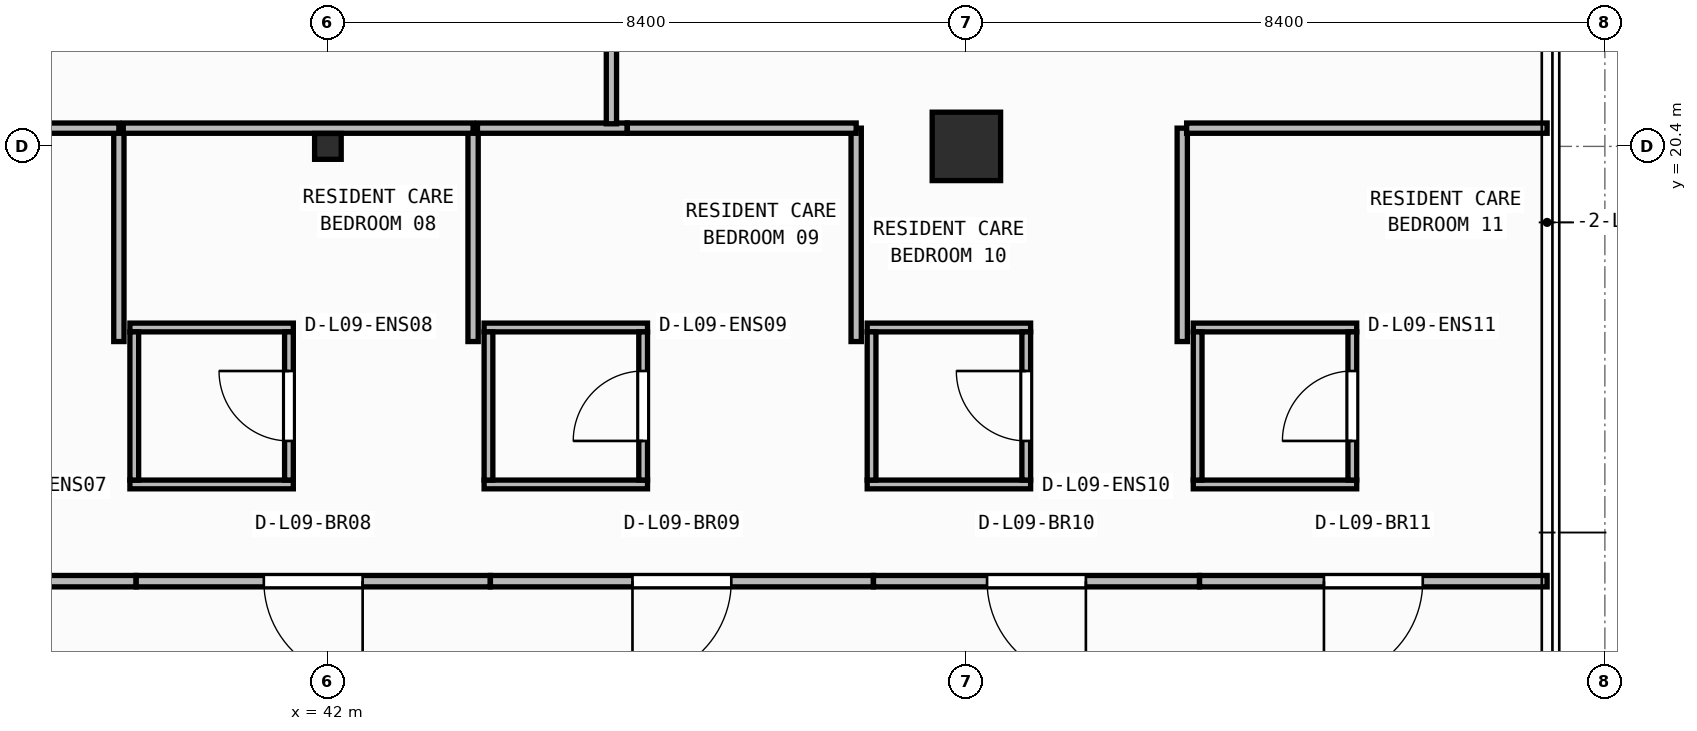
"""IFC4 building model, lengths in metres.
Left out: names, types, materials, properties, quantities, classifications, styles, units other than length and angle.
Written with IfcOpenShell. Run it as: python <this file> out.ifc"""

import sys

from ifc_helpers import new_model, si_unit, direction, frame, frame_2d, origin, origin_2d, place, context, subcontext, project, spatial, rectangle, i_section, extrude, element, fill, save


model = new_model("IFC4")
c1 = context("Model", 3, precision=1e-05, world=origin(), true_north=direction((0.0, 1.0)))
c2 = subcontext(c1, "Body", "Model", "MODEL_VIEW")
j1 = project(units=[si_unit("LENGTHUNIT", "METRE"), si_unit("PLANEANGLEUNIT", "RADIAN")], contexts=[c1])
p1 = place(None, origin())
s1 = spatial("IfcSite", under=j1, at=p1, CompositionType="ELEMENT")
p2 = place(p1, origin())
s2 = spatial("IfcBuilding", under=s1, at=p2, CompositionType="ELEMENT")
p3 = place(p2, frame((0.0, 0.0, 38.3)))
s3 = spatial("IfcBuildingStorey", under=s2, at=p3, CompositionType="ELEMENT", Elevation=38.3)
p4 = place(p3, frame((42.0, 20.4, 0.0), z_axis=(0.0, 0.0, 1.0), x_axis=(1.0, 0.0, 0.0)))
e1 = element("IfcColumn", 1, at=p4, inside=s3, PredefinedType="COLUMN", context=c2, shape_type="SweptSolid", body=[
    extrude(i_section(OverallWidth=0.35, OverallDepth=0.34, WebThickness=0.016, FlangeThickness=0.028, at=origin_2d()), origin(), (0.0, 0.0, 1.0), 3.95),
])
p5 = place(p3, frame((50.4, 20.4, 0.0), z_axis=(0.0, 0.0, 1.0), x_axis=(1.0, 0.0, 0.0)))
e2 = element("IfcColumn", 2, at=p5, inside=s3, PredefinedType="COLUMN", context=c2, shape_type="SweptSolid", body=[
    extrude(rectangle(XDim=0.9, YDim=0.9, at=origin_2d()), origin(), (0.0, 0.0, 1.0), 3.95),
])
p6 = place(p3, frame((39.395, 15.952, 0.0), z_axis=(0.0, 0.0, 1.0), x_axis=(1.0, 0.0, 0.0)))
e3 = element("IfcWall", 3, at=p6, inside=s3, PredefinedType="PARTITIONING", context=c2, shape_type="SweptSolid", body=[
    extrude(rectangle(XDim=2.15, YDim=0.115, at=frame_2d((1.075, 0.0))), origin(), (0.0, 0.0, 1.0), 3.429),
])
p7 = place(p3, frame((39.395, 18.018, 0.0), z_axis=(0.0, 0.0, 1.0), x_axis=(1.0, 0.0, 0.0)))
e4 = element("IfcWall", 4, at=p7, inside=s3, PredefinedType="PARTITIONING", context=c2, shape_type="SweptSolid", body=[
    extrude(rectangle(XDim=2.15, YDim=0.115, at=frame_2d((1.075, 0.0))), origin(), (0.0, 0.0, 1.0), 3.71),
])
p8 = place(p3, frame((39.452, 16.01, 0.0), z_axis=(0.0, 0.0, 1.0), x_axis=(0.0, 1.0, 0.0)))
e5 = element("IfcWall", 5, at=p8, inside=s3, PredefinedType="PARTITIONING", context=c2, shape_type="SweptSolid", body=[
    extrude(rectangle(XDim=1.95, YDim=0.115, at=frame_2d((0.975, 0.0))), origin(), (0.0, 0.0, 1.0), 3.71),
])
p9 = place(p3, frame((41.488, 16.01, 0.0), z_axis=(0.0, 0.0, 1.0), x_axis=(0.0, 1.0, 0.0)))
e6 = element("IfcWall", 6, at=p9, inside=s3, PredefinedType="PARTITIONING", context=c2, shape_type="SweptSolid", body=[
    extrude(rectangle(XDim=1.95, YDim=0.115, at=frame_2d((0.975, 0.0))), origin(), (0.0, 0.0, 1.0), 3.71),
])
p10 = place(p9, frame((0.515, 0.0, 0.0)))
e7 = element("IfcOpeningElement", 7, at=p10, cuts=e6, PredefinedType="OPENING", context=c2, shape_type="SweptSolid", body=[
    extrude(rectangle(XDim=0.92, YDim=2.1, at=frame_2d((0.46, 1.05))), frame((0.0, 0.067, 0.0), z_axis=(0.0, -1.0, 0.0), x_axis=(1.0, 0.0, 0.0)), (0.0, 0.0, 1.0), 0.135),
])
p11 = place(p3, frame((44.055, 15.952, 0.0), z_axis=(0.0, 0.0, 1.0), x_axis=(1.0, 0.0, 0.0)))
e8 = element("IfcWall", 8, at=p11, inside=s3, PredefinedType="PARTITIONING", context=c2, shape_type="SweptSolid", body=[
    extrude(rectangle(XDim=2.15, YDim=0.115, at=frame_2d((1.075, 0.0))), origin(), (0.0, 0.0, 1.0), 3.429),
])
p12 = place(p3, frame((44.055, 18.018, 0.0), z_axis=(0.0, 0.0, 1.0), x_axis=(1.0, 0.0, 0.0)))
e9 = element("IfcWall", 9, at=p12, inside=s3, PredefinedType="PARTITIONING", context=c2, shape_type="SweptSolid", body=[
    extrude(rectangle(XDim=2.15, YDim=0.115, at=frame_2d((1.075, 0.0))), origin(), (0.0, 0.0, 1.0), 3.71),
])
p13 = place(p3, frame((44.113, 16.01, 0.0), z_axis=(0.0, 0.0, 1.0), x_axis=(0.0, 1.0, 0.0)))
e10 = element("IfcWall", 10, at=p13, inside=s3, PredefinedType="PARTITIONING", context=c2, shape_type="SweptSolid", body=[
    extrude(rectangle(XDim=1.95, YDim=0.115, at=frame_2d((0.975, 0.0))), origin(), (0.0, 0.0, 1.0), 3.71),
])
p14 = place(p3, frame((46.147, 16.01, 0.0), z_axis=(0.0, 0.0, 1.0), x_axis=(0.0, 1.0, 0.0)))
e11 = element("IfcWall", 11, at=p14, inside=s3, PredefinedType="PARTITIONING", context=c2, shape_type="SweptSolid", body=[
    extrude(rectangle(XDim=1.95, YDim=0.115, at=frame_2d((0.975, 0.0))), origin(), (0.0, 0.0, 1.0), 3.71),
])
p15 = place(p14, frame((0.515, 0.0, 0.0)))
e12 = element("IfcOpeningElement", 12, at=p15, cuts=e11, PredefinedType="OPENING", context=c2, shape_type="SweptSolid", body=[
    extrude(rectangle(XDim=0.92, YDim=2.1, at=frame_2d((0.46, 1.05))), frame((0.0, 0.067, 0.0), z_axis=(0.0, -1.0, 0.0), x_axis=(1.0, 0.0, 0.0)), (0.0, 0.0, 1.0), 0.135),
])
p16 = place(p3, frame((49.095, 15.952, 0.0), z_axis=(0.0, 0.0, 1.0), x_axis=(1.0, 0.0, 0.0)))
e13 = element("IfcWall", 13, at=p16, inside=s3, PredefinedType="PARTITIONING", context=c2, shape_type="SweptSolid", body=[
    extrude(rectangle(XDim=2.15, YDim=0.115, at=frame_2d((1.075, 0.0))), origin(), (0.0, 0.0, 1.0), 3.429),
])
p17 = place(p3, frame((49.095, 18.018, 0.0), z_axis=(0.0, 0.0, 1.0), x_axis=(1.0, 0.0, 0.0)))
e14 = element("IfcWall", 14, at=p17, inside=s3, PredefinedType="PARTITIONING", context=c2, shape_type="SweptSolid", body=[
    extrude(rectangle(XDim=2.15, YDim=0.115, at=frame_2d((1.075, 0.0))), origin(), (0.0, 0.0, 1.0), 3.71),
])
p18 = place(p3, frame((49.153, 16.01, 0.0), z_axis=(0.0, 0.0, 1.0), x_axis=(0.0, 1.0, 0.0)))
e15 = element("IfcWall", 15, at=p18, inside=s3, PredefinedType="PARTITIONING", context=c2, shape_type="SweptSolid", body=[
    extrude(rectangle(XDim=1.95, YDim=0.115, at=frame_2d((0.975, 0.0))), origin(), (0.0, 0.0, 1.0), 3.71),
])
p19 = place(p3, frame((51.188, 16.01, 0.0), z_axis=(0.0, 0.0, 1.0), x_axis=(0.0, 1.0, 0.0)))
e16 = element("IfcWall", 16, at=p19, inside=s3, PredefinedType="PARTITIONING", context=c2, shape_type="SweptSolid", body=[
    extrude(rectangle(XDim=1.95, YDim=0.115, at=frame_2d((0.975, 0.0))), origin(), (0.0, 0.0, 1.0), 3.71),
])
p20 = place(p19, frame((0.515, 0.0, 0.0)))
e17 = element("IfcOpeningElement", 17, at=p20, cuts=e16, PredefinedType="OPENING", context=c2, shape_type="SweptSolid", body=[
    extrude(rectangle(XDim=0.92, YDim=2.1, at=frame_2d((0.46, 1.05))), frame((0.0, 0.067, 0.0), z_axis=(0.0, -1.0, 0.0), x_axis=(1.0, 0.0, 0.0)), (0.0, 0.0, 1.0), 0.135),
])
for number, where, z_axis, x_axis in (
    (18, (53.385, 15.952, 0.0), (0.0, 0.0, 1.0), (1.0, 0.0, 0.0)),
    (19, (53.385, 18.018, 0.0), (0.0, 0.0, 1.0), (1.0, 0.0, 0.0)),
):
    element("IfcWall", number, at=place(p3, frame(where, z_axis=z_axis, x_axis=x_axis)), inside=s3, PredefinedType="PARTITIONING", context=c2, shape_type="SweptSolid", body=[
        extrude(rectangle(XDim=2.15, YDim=0.115, at=frame_2d((1.075, 0.0))), origin(), (0.0, 0.0, 1.0), 3.71),
    ])
p21 = place(p3, frame((53.442, 16.01, 0.0), z_axis=(0.0, 0.0, 1.0), x_axis=(0.0, 1.0, 0.0)))
e20 = element("IfcWall", 20, at=p21, inside=s3, PredefinedType="PARTITIONING", context=c2, shape_type="SweptSolid", body=[
    extrude(rectangle(XDim=1.95, YDim=0.115, at=frame_2d((0.975, 0.0))), origin(), (0.0, 0.0, 1.0), 3.71),
])
p22 = place(p3, frame((55.478, 16.01, 0.0), z_axis=(0.0, 0.0, 1.0), x_axis=(0.0, 1.0, 0.0)))
e21 = element("IfcWall", 21, at=p22, inside=s3, PredefinedType="PARTITIONING", context=c2, shape_type="SweptSolid", body=[
    extrude(rectangle(XDim=1.95, YDim=0.115, at=frame_2d((0.975, 0.0))), origin(), (0.0, 0.0, 1.0), 3.71),
])
p23 = place(p22, frame((0.515, 0.0, 0.0)))
e22 = element("IfcOpeningElement", 22, at=p23, cuts=e21, PredefinedType="OPENING", context=c2, shape_type="SweptSolid", body=[
    extrude(rectangle(XDim=0.92, YDim=2.1, at=frame_2d((0.46, 1.05))), frame((0.0, 0.067, 0.0), z_axis=(0.0, -1.0, 0.0), x_axis=(1.0, 0.0, 0.0)), (0.0, 0.0, 1.0), 0.135),
])
p24 = place(p3, frame((39.476, 14.68, 0.0), z_axis=(0.0, 0.0, 1.0), x_axis=(-1.0, 0.0, 0.0)))
e23 = element("IfcWall", 23, at=p24, inside=s3, PredefinedType="PARTITIONING", context=c2, shape_type="SweptSolid", body=[
    extrude(rectangle(XDim=4.288, YDim=0.15, at=frame_2d((2.144, 0.0))), origin(), (0.0, 0.0, 1.0), 3.71),
])
p25 = place(p24, frame((1.494, 0.0, 0.0)))
e24 = element("IfcOpeningElement", 24, at=p25, cuts=e23, PredefinedType="OPENING", context=c2, shape_type="SweptSolid", body=[
    extrude(rectangle(XDim=1.3, YDim=2.15, at=frame_2d((0.65, 1.075))), frame((0.0, 0.085, 0.0), z_axis=(0.0, -1.0, 0.0), x_axis=(1.0, 0.0, 0.0)), (0.0, 0.0, 1.0), 0.17),
])
p26 = place(p3, frame((44.136, 14.68, 0.0), z_axis=(0.0, 0.0, 1.0), x_axis=(-1.0, 0.0, 0.0)))
e25 = element("IfcWall", 25, at=p26, inside=s3, PredefinedType="PARTITIONING", context=c2, shape_type="SweptSolid", body=[
    extrude(rectangle(XDim=4.658, YDim=0.15, at=frame_2d((2.329, 0.0))), origin(), (0.0, 0.0, 1.0), 3.71),
])
p27 = place(p26, frame((1.679, 0.0, 0.0)))
e26 = element("IfcOpeningElement", 26, at=p27, cuts=e25, PredefinedType="OPENING", context=c2, shape_type="SweptSolid", body=[
    extrude(rectangle(XDim=1.3, YDim=2.15, at=frame_2d((0.65, 1.075))), frame((0.0, 0.085, 0.0), z_axis=(0.0, -1.0, 0.0), x_axis=(1.0, 0.0, 0.0)), (0.0, 0.0, 1.0), 0.17),
])
p28 = place(p3, frame((49.176, 14.68, 0.0), z_axis=(0.0, 0.0, 1.0), x_axis=(-1.0, 0.0, 0.0)))
e27 = element("IfcWall", 27, at=p28, inside=s3, PredefinedType="PARTITIONING", context=c2, shape_type="SweptSolid", body=[
    extrude(rectangle(XDim=5.038, YDim=0.15, at=frame_2d((2.519, 0.0))), origin(), (0.0, 0.0, 1.0), 3.71),
])
p29 = place(p28, frame((1.869, 0.0, 0.0)))
e28 = element("IfcOpeningElement", 28, at=p29, cuts=e27, PredefinedType="OPENING", context=c2, shape_type="SweptSolid", body=[
    extrude(rectangle(XDim=1.3, YDim=2.15, at=frame_2d((0.65, 1.075))), frame((0.0, 0.085, 0.0), z_axis=(0.0, -1.0, 0.0), x_axis=(1.0, 0.0, 0.0)), (0.0, 0.0, 1.0), 0.17),
])
p30 = place(p3, frame((53.466, 14.68, 0.0), z_axis=(0.0, 0.0, 1.0), x_axis=(-1.0, 0.0, 0.0)))
e29 = element("IfcWall", 29, at=p30, inside=s3, PredefinedType="PARTITIONING", context=c2, shape_type="SweptSolid", body=[
    extrude(rectangle(XDim=4.288, YDim=0.15, at=frame_2d((2.144, 0.0))), origin(), (0.0, 0.0, 1.0), 3.71),
])
p31 = place(p30, frame((1.494, 0.0, 0.0)))
e30 = element("IfcOpeningElement", 30, at=p31, cuts=e29, PredefinedType="OPENING", context=c2, shape_type="SweptSolid", body=[
    extrude(rectangle(XDim=1.3, YDim=2.15, at=frame_2d((0.65, 1.075))), frame((0.0, 0.085, 0.0), z_axis=(0.0, -1.0, 0.0), x_axis=(1.0, 0.0, 0.0)), (0.0, 0.0, 1.0), 0.17),
])
p32 = place(p3, frame((58.04, 14.68, 0.0), z_axis=(0.0, 0.0, 1.0), x_axis=(-1.0, 0.0, 0.0)))
e31 = element("IfcWall", 31, at=p32, inside=s3, PredefinedType="PARTITIONING", context=c2, shape_type="SweptSolid", body=[
    extrude(rectangle(XDim=4.572, YDim=0.15, at=frame_2d((2.286, 0.0))), origin(), (0.0, 0.0, 1.0), 3.71),
])
p33 = place(p32, frame((1.636, 0.0, 0.0)))
e32 = element("IfcOpeningElement", 32, at=p33, cuts=e31, PredefinedType="OPENING", context=c2, shape_type="SweptSolid", body=[
    extrude(rectangle(XDim=1.3, YDim=2.15, at=frame_2d((0.65, 1.075))), frame((0.0, 0.085, 0.0), z_axis=(0.0, -1.0, 0.0), x_axis=(1.0, 0.0, 0.0)), (0.0, 0.0, 1.0), 0.17),
])
p34 = place(p3, frame((39.25, 17.833, 0.0), z_axis=(0.0, 0.0, 1.0), x_axis=(0.0, 1.0, 0.0)))
e33 = element("IfcWall", 33, at=p34, inside=s3, PredefinedType="PARTITIONING", context=c2, shape_type="SweptSolid", body=[
    extrude(rectangle(XDim=2.807, YDim=0.135, at=frame_2d((1.404, 0.0))), origin(), (0.0, 0.0, 1.0), 3.71),
])
p35 = place(p3, frame((39.25, 20.64, 0.0), z_axis=(0.0, 0.0, 1.0), x_axis=(-1.0, 0.0, 0.0)))
e34 = element("IfcWall", 34, at=p35, inside=s3, PredefinedType="PARTITIONING", context=c2, shape_type="SweptSolid", body=[
    extrude(rectangle(XDim=2.72, YDim=0.135, at=frame_2d((1.36, 0.0))), origin(), (0.0, 0.0, 1.0), 3.073),
])
p36 = place(p3, frame((43.91, 17.833, 0.0), z_axis=(0.0, 0.0, 1.0), x_axis=(0.0, 1.0, 0.0)))
e35 = element("IfcWall", 35, at=p36, inside=s3, PredefinedType="PARTITIONING", context=c2, shape_type="SweptSolid", body=[
    extrude(rectangle(XDim=2.807, YDim=0.135, at=frame_2d((1.404, 0.0))), origin(), (0.0, 0.0, 1.0), 3.71),
])
p37 = place(p3, frame((43.91, 20.64, 0.0), z_axis=(0.0, 0.0, 1.0), x_axis=(-1.0, 0.0, 0.0)))
e36 = element("IfcWall", 36, at=p37, inside=s3, PredefinedType="PARTITIONING", context=c2, shape_type="SweptSolid", body=[
    extrude(rectangle(XDim=4.602, YDim=0.135, at=frame_2d((2.301, 0.0))), origin(), (0.0, 0.0, 1.0), 3.073),
])
p38 = place(p3, frame((48.95, 17.833, 0.0), z_axis=(0.0, 0.0, 1.0), x_axis=(0.0, 1.0, 0.0)))
e37 = element("IfcWall", 37, at=p38, inside=s3, PredefinedType="PARTITIONING", context=c2, shape_type="SweptSolid", body=[
    extrude(rectangle(XDim=2.807, YDim=0.135, at=frame_2d((1.404, 0.0))), origin(), (0.0, 0.0, 1.0), 3.71),
])
p39 = place(p3, frame((45.938, 20.64, 0.0), z_axis=(0.0, 0.0, 1.0), x_axis=(-1.0, 0.0, 0.0)))
e38 = element("IfcWall", 38, at=p39, inside=s3, PredefinedType="PARTITIONING", context=c2, shape_type="SweptSolid", body=[
    extrude(rectangle(XDim=1.97, YDim=0.135, at=frame_2d((0.985, 0.0))), origin(), (0.0, 0.0, 1.0), 3.073),
])
p40 = place(p3, frame((48.95, 20.64, 0.0), z_axis=(0.0, 0.0, 1.0), x_axis=(-1.0, 0.0, 0.0)))
e39 = element("IfcWall", 39, at=p40, inside=s3, PredefinedType="PARTITIONING", context=c2, shape_type="SweptSolid", body=[
    extrude(rectangle(XDim=3.01, YDim=0.135, at=frame_2d((1.505, 0.0))), origin(), (0.0, 0.0, 1.0), 3.073),
])
p41 = place(p3, frame((53.24, 17.833, 0.0), z_axis=(0.0, 0.0, 1.0), x_axis=(0.0, 1.0, 0.0)))
e40 = element("IfcWall", 40, at=p41, inside=s3, PredefinedType="PARTITIONING", context=c2, shape_type="SweptSolid", body=[
    extrude(rectangle(XDim=2.807, YDim=0.135, at=frame_2d((1.404, 0.0))), origin(), (0.0, 0.0, 1.0), 3.71),
])
p42 = place(p3, frame((58.04, 20.64, 0.0), z_axis=(0.0, 0.0, 1.0), x_axis=(-1.0, 0.0, 0.0)))
e41 = element("IfcWall", 41, at=p42, inside=s3, PredefinedType="PARTITIONING", context=c2, shape_type="SweptSolid", body=[
    extrude(rectangle(XDim=4.742, YDim=0.135, at=frame_2d((2.371, 0.0))), origin(), (0.0, 0.0, 1.0), 3.71),
])
p43 = place(p3, frame((45.73, 20.698, 0.0), z_axis=(0.0, 0.0, 1.0), x_axis=(0.0, 1.0, 0.0)))
e42 = element("IfcWall", 42, at=p43, inside=s3, PredefinedType="PARTITIONING", context=c2, shape_type="SweptSolid", body=[
    extrude(rectangle(XDim=11.756, YDim=0.135, at=frame_2d((5.878, 0.0))), origin(), (0.0, 0.0, 1.0), 3.71),
])
p44 = place(p43, frame((5.328, 0.0, 0.0)))
e43 = element("IfcOpeningElement", 43, at=p44, cuts=e42, PredefinedType="OPENING", context=c2, shape_type="SweptSolid", body=[
    extrude(rectangle(XDim=1.1, YDim=2.1, at=frame_2d((0.55, 1.05))), frame((0.0, 0.077, 0.0), z_axis=(0.0, -1.0, 0.0), x_axis=(1.0, 0.0, 0.0)), (0.0, 0.0, 1.0), 0.155),
])
p45 = place(p10, origin())
e44 = element("IfcDoor", 44, at=p45, inside=s3, OperationType="SINGLE_SWING_RIGHT", PredefinedType="DOOR", context=c2, shape_type="SweptSolid", body=[
    extrude(rectangle(XDim=0.92, YDim=2.1, at=frame_2d((0.46, 1.05))), frame((0.0, 0.025, 0.0), z_axis=(0.0, -1.0, 0.0), x_axis=(1.0, 0.0, 0.0)), (0.0, 0.0, 1.0), 0.05),
])
fill(e7, e44)
p46 = place(p15, origin())
e45 = element("IfcDoor", 45, at=p46, inside=s3, OperationType="SINGLE_SWING_LEFT", PredefinedType="DOOR", context=c2, shape_type="SweptSolid", body=[
    extrude(rectangle(XDim=0.92, YDim=2.1, at=frame_2d((0.46, 1.05))), frame((0.0, 0.025, 0.0), z_axis=(0.0, -1.0, 0.0), x_axis=(1.0, 0.0, 0.0)), (0.0, 0.0, 1.0), 0.05),
])
fill(e12, e45)
p47 = place(p20, origin())
e46 = element("IfcDoor", 46, at=p47, inside=s3, OperationType="SINGLE_SWING_RIGHT", PredefinedType="DOOR", context=c2, shape_type="SweptSolid", body=[
    extrude(rectangle(XDim=0.92, YDim=2.1, at=frame_2d((0.46, 1.05))), frame((0.0, 0.025, 0.0), z_axis=(0.0, -1.0, 0.0), x_axis=(1.0, 0.0, 0.0)), (0.0, 0.0, 1.0), 0.05),
])
fill(e17, e46)
p48 = place(p23, origin())
e47 = element("IfcDoor", 47, at=p48, inside=s3, OperationType="SINGLE_SWING_LEFT", PredefinedType="DOOR", context=c2, shape_type="SweptSolid", body=[
    extrude(rectangle(XDim=0.92, YDim=2.1, at=frame_2d((0.46, 1.05))), frame((0.0, 0.025, 0.0), z_axis=(0.0, -1.0, 0.0), x_axis=(1.0, 0.0, 0.0)), (0.0, 0.0, 1.0), 0.05),
])
fill(e22, e47)
p49 = place(p27, origin())
e48 = element("IfcDoor", 48, at=p49, inside=s3, OperationType="SINGLE_SWING_LEFT", PredefinedType="DOOR", context=c2, shape_type="SweptSolid", body=[
    extrude(rectangle(XDim=1.3, YDim=2.15, at=frame_2d((0.65, 1.075))), frame((0.0, 0.025, 0.0), z_axis=(0.0, -1.0, 0.0), x_axis=(1.0, 0.0, 0.0)), (0.0, 0.0, 1.0), 0.05),
])
fill(e26, e48)
p50 = place(p29, origin())
e49 = element("IfcDoor", 49, at=p50, inside=s3, OperationType="SINGLE_SWING_RIGHT", PredefinedType="DOOR", context=c2, shape_type="SweptSolid", body=[
    extrude(rectangle(XDim=1.3, YDim=2.15, at=frame_2d((0.65, 1.075))), frame((0.0, 0.025, 0.0), z_axis=(0.0, -1.0, 0.0), x_axis=(1.0, 0.0, 0.0)), (0.0, 0.0, 1.0), 0.05),
])
fill(e28, e49)
p51 = place(p31, origin())
e50 = element("IfcDoor", 50, at=p51, inside=s3, OperationType="SINGLE_SWING_LEFT", PredefinedType="DOOR", context=c2, shape_type="SweptSolid", body=[
    extrude(rectangle(XDim=1.3, YDim=2.15, at=frame_2d((0.65, 1.075))), frame((0.0, 0.025, 0.0), z_axis=(0.0, -1.0, 0.0), x_axis=(1.0, 0.0, 0.0)), (0.0, 0.0, 1.0), 0.05),
])
fill(e30, e50)
p52 = place(p33, origin())
e51 = element("IfcDoor", 51, at=p52, inside=s3, OperationType="SINGLE_SWING_RIGHT", PredefinedType="DOOR", context=c2, shape_type="SweptSolid", body=[
    extrude(rectangle(XDim=1.3, YDim=2.15, at=frame_2d((0.65, 1.075))), frame((0.0, 0.025, 0.0), z_axis=(0.0, -1.0, 0.0), x_axis=(1.0, 0.0, 0.0)), (0.0, 0.0, 1.0), 0.05),
])
fill(e32, e51)
save(model, sys.argv[1])
